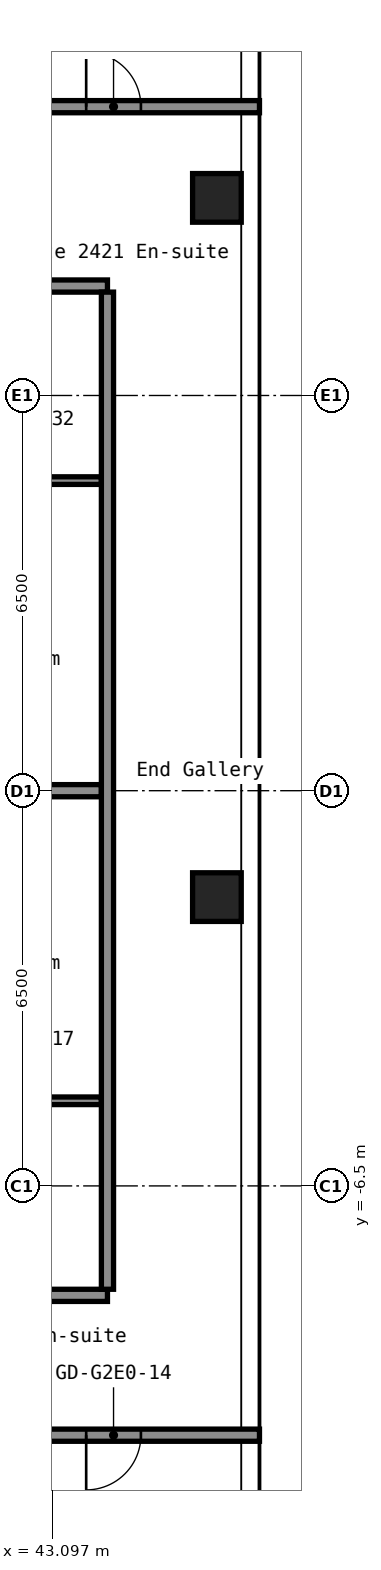
"""IFC4 building model, lengths in metres.
Left out: names, types, materials, properties, quantities, classifications, styles, units other than length and angle.
Written with IfcOpenShell. Run it as: python <this file> out.ifc"""

import sys

from ifc_helpers import new_model, si_unit, direction, frame, frame_2d, origin, origin_2d, place, context, subcontext, project, spatial, rectangle, hollow_rectangle, extrude, element, fill, save


model = new_model("IFC4")
c1 = context("Model", 3, precision=1e-05, world=origin(), true_north=direction((0.0, 1.0)))
c2 = subcontext(c1, "Body", "Model", "MODEL_VIEW")
j1 = project(units=[si_unit("LENGTHUNIT", "METRE"), si_unit("PLANEANGLEUNIT", "RADIAN")], contexts=[c1])
p1 = place(None, origin())
s1 = spatial("IfcSite", under=j1, at=p1, CompositionType="ELEMENT")
p2 = place(p1, origin())
s2 = spatial("IfcBuilding", under=s1, at=p2, CompositionType="ELEMENT")
p3 = place(p2, frame((0.0, 0.0, 88.2)))
s3 = spatial("IfcBuildingStorey", under=s2, at=p3, CompositionType="ELEMENT", Elevation=88.2)
for number, where, z_axis, x_axis in (
    (1, (45.8, -1.75, 0.0), (0.0, 0.0, 1.0), (1.0, 0.0, 0.0)),
    (2, (45.8, 9.75, 0.0), (0.0, 0.0, 1.0), (1.0, 0.0, 0.0)),
):
    element("IfcColumn", number, at=place(p3, frame(where, z_axis=z_axis, x_axis=x_axis)), inside=s3, PredefinedType="COLUMN", context=c2, shape_type="SweptSolid", body=[
        extrude(hollow_rectangle(XDim=0.8, YDim=0.8, WallThickness=0.032, at=origin_2d()), origin(), (0.0, 0.0, 1.0), 2.8),
    ])
p4 = place(p3, frame((16.8, -10.6, 0.0), z_axis=(0.0, 0.0, 1.0), x_axis=(1.0, 0.0, 0.0)))
e3 = element("IfcWall", 3, at=p4, inside=s3, PredefinedType="PARTITIONING", context=c2, shape_type="SweptSolid", body=[
    extrude(rectangle(XDim=29.7, YDim=0.2, at=frame_2d((14.85, 0.0))), origin(), (0.0, 0.0, 1.0), 2.8),
])
p5 = place(p4, frame((1.315, 0.0, 0.0)))
e4 = element("IfcOpeningElement", 4, at=p5, cuts=e3, PredefinedType="OPENING", context=c2, shape_type="SweptSolid", body=[
    extrude(rectangle(XDim=0.9, YDim=2.1, at=frame_2d((0.45, 1.05))), frame((0.0, 0.11, 0.0), z_axis=(0.0, -1.0, 0.0), x_axis=(1.0, 0.0, 0.0)), (0.0, 0.0, 1.0), 0.22),
])
p6 = place(p4, frame((5.515, 0.0, 0.0)))
e5 = element("IfcOpeningElement", 5, at=p6, cuts=e3, PredefinedType="OPENING", context=c2, shape_type="SweptSolid", body=[
    extrude(rectangle(XDim=0.9, YDim=2.1, at=frame_2d((0.45, 1.05))), frame((0.0, 0.11, 0.0), z_axis=(0.0, -1.0, 0.0), x_axis=(1.0, 0.0, 0.0)), (0.0, 0.0, 1.0), 0.22),
])
p7 = place(p4, frame((9.8, 0.0, 0.0)))
e6 = element("IfcOpeningElement", 6, at=p7, cuts=e3, PredefinedType="OPENING", context=c2, shape_type="SweptSolid", body=[
    extrude(rectangle(XDim=0.9, YDim=2.1, at=frame_2d((0.45, 1.05))), frame((0.0, 0.11, 0.0), z_axis=(0.0, -1.0, 0.0), x_axis=(1.0, 0.0, 0.0)), (0.0, 0.0, 1.0), 0.22),
])
p8 = place(p4, frame((14.0, 0.0, 0.0)))
e7 = element("IfcOpeningElement", 7, at=p8, cuts=e3, PredefinedType="OPENING", context=c2, shape_type="SweptSolid", body=[
    extrude(rectangle(XDim=0.9, YDim=2.1, at=frame_2d((0.45, 1.05))), frame((0.0, 0.11, 0.0), z_axis=(0.0, -1.0, 0.0), x_axis=(1.0, 0.0, 0.0)), (0.0, 0.0, 1.0), 0.22),
])
p9 = place(p4, frame((18.28, 0.0, 0.0)))
e8 = element("IfcOpeningElement", 8, at=p9, cuts=e3, PredefinedType="OPENING", context=c2, shape_type="SweptSolid", body=[
    extrude(rectangle(XDim=0.9, YDim=2.1, at=frame_2d((0.45, 1.05))), frame((0.0, 0.11, 0.0), z_axis=(0.0, -1.0, 0.0), x_axis=(1.0, 0.0, 0.0)), (0.0, 0.0, 1.0), 0.22),
])
p10 = place(p4, frame((22.48, 0.0, 0.0)))
e9 = element("IfcOpeningElement", 9, at=p10, cuts=e3, PredefinedType="OPENING", context=c2, shape_type="SweptSolid", body=[
    extrude(rectangle(XDim=0.9, YDim=2.1, at=frame_2d((0.45, 1.05))), frame((0.0, 0.11, 0.0), z_axis=(0.0, -1.0, 0.0), x_axis=(1.0, 0.0, 0.0)), (0.0, 0.0, 1.0), 0.22),
])
p11 = place(p4, frame((26.85, 0.0, 0.0)))
e10 = element("IfcOpeningElement", 10, at=p11, cuts=e3, PredefinedType="OPENING", context=c2, shape_type="SweptSolid", body=[
    extrude(rectangle(XDim=0.9, YDim=2.1, at=frame_2d((0.45, 1.05))), frame((0.0, 0.11, 0.0), z_axis=(0.0, -1.0, 0.0), x_axis=(1.0, 0.0, 0.0)), (0.0, 0.0, 1.0), 0.22),
])
p12 = place(p3, frame((33.6, -8.3, 0.0), z_axis=(0.0, 0.0, 1.0), x_axis=(1.0, 0.0, 0.0)))
e11 = element("IfcWall", 11, at=p12, inside=s3, PredefinedType="PARTITIONING", context=c2, shape_type="SweptSolid", body=[
    extrude(rectangle(XDim=10.4, YDim=0.2, at=frame_2d((5.2, 0.0))), origin(), (0.0, 0.0, 1.0), 2.8),
])
p13 = place(p12, frame((2.1, 0.0, 0.0)))
e12 = element("IfcOpeningElement", 12, at=p13, cuts=e11, PredefinedType="OPENING", context=c2, shape_type="SweptSolid", body=[
    extrude(rectangle(XDim=1.0, YDim=2.1, at=frame_2d((0.5, 1.05))), frame((0.0, 0.11, 0.0), z_axis=(0.0, -1.0, 0.0), x_axis=(1.0, 0.0, 0.0)), (0.0, 0.0, 1.0), 0.22),
])
p14 = place(p3, frame((41.062, -5.1, 0.0), z_axis=(0.0, 0.0, 1.0), x_axis=(1.0, 0.0, 0.0)))
e13 = element("IfcWall", 13, at=p14, inside=s3, PredefinedType="PARTITIONING", context=c2, shape_type="SweptSolid", body=[
    extrude(rectangle(XDim=2.837, YDim=0.125, at=frame_2d((1.419, 0.0))), origin(), (0.0, 0.0, 1.0), 2.8),
])
p15 = place(p14, frame((1.038, 0.0, 0.0)))
e14 = element("IfcOpeningElement", 14, at=p15, cuts=e13, PredefinedType="OPENING", context=c2, shape_type="SweptSolid", body=[
    extrude(rectangle(XDim=0.8, YDim=2.1, at=frame_2d((0.4, 1.05))), frame((0.0, 0.073, 0.0), z_axis=(0.0, -1.0, 0.0), x_axis=(1.0, 0.0, 0.0)), (0.0, 0.0, 1.0), 0.145),
])
p16 = place(p3, frame((33.6, 0.0, 0.0), z_axis=(0.0, 0.0, 1.0), x_axis=(1.0, 0.0, 0.0)))
e15 = element("IfcWall", 15, at=p16, inside=s3, PredefinedType="PARTITIONING", context=c2, shape_type="SweptSolid", body=[
    extrude(rectangle(XDim=10.3, YDim=0.2, at=frame_2d((5.15, 0.0))), origin(), (0.0, 0.0, 1.0), 2.8),
])
p17 = place(p3, frame((41.062, 5.1, 0.0), z_axis=(0.0, 0.0, 1.0), x_axis=(1.0, 0.0, 0.0)))
e16 = element("IfcWall", 16, at=p17, inside=s3, PredefinedType="PARTITIONING", context=c2, shape_type="SweptSolid", body=[
    extrude(rectangle(XDim=2.837, YDim=0.125, at=frame_2d((1.419, 0.0))), origin(), (0.0, 0.0, 1.0), 2.8),
])
p18 = place(p17, frame((1.038, 0.0, 0.0)))
e17 = element("IfcOpeningElement", 17, at=p18, cuts=e16, PredefinedType="OPENING", context=c2, shape_type="SweptSolid", body=[
    extrude(rectangle(XDim=0.8, YDim=2.1, at=frame_2d((0.4, 1.05))), frame((0.0, 0.073, 0.0), z_axis=(0.0, -1.0, 0.0), x_axis=(1.0, 0.0, 0.0)), (0.0, 0.0, 1.0), 0.145),
])
p19 = place(p3, frame((33.6, 8.3, 0.0), z_axis=(0.0, 0.0, 1.0), x_axis=(1.0, 0.0, 0.0)))
e18 = element("IfcWall", 18, at=p19, inside=s3, PredefinedType="PARTITIONING", context=c2, shape_type="SweptSolid", body=[
    extrude(rectangle(XDim=10.4, YDim=0.2, at=frame_2d((5.2, 0.0))), origin(), (0.0, 0.0, 1.0), 2.8),
])
p20 = place(p19, frame((2.1, 0.0, 0.0)))
e19 = element("IfcOpeningElement", 19, at=p20, cuts=e18, PredefinedType="OPENING", context=c2, shape_type="SweptSolid", body=[
    extrude(rectangle(XDim=1.0, YDim=2.1, at=frame_2d((0.5, 1.05))), frame((0.0, 0.11, 0.0), z_axis=(0.0, -1.0, 0.0), x_axis=(1.0, 0.0, 0.0)), (0.0, 0.0, 1.0), 0.22),
])
p21 = place(p3, frame((16.8, 11.25, 0.0), z_axis=(0.0, 0.0, 1.0), x_axis=(1.0, 0.0, 0.0)))
e20 = element("IfcWall", 20, at=p21, inside=s3, PredefinedType="PARTITIONING", context=c2, shape_type="SweptSolid", body=[
    extrude(rectangle(XDim=29.7, YDim=0.2, at=frame_2d((14.85, 0.0))), origin(), (0.0, 0.0, 1.0), 2.8),
])
p22 = place(p21, frame((5.8, 0.0, 0.0)))
e21 = element("IfcOpeningElement", 21, at=p22, cuts=e20, PredefinedType="OPENING", context=c2, shape_type="SweptSolid", body=[
    extrude(rectangle(XDim=1.0, YDim=2.1, at=frame_2d((0.5, 1.05))), frame((0.0, 0.11, 0.0), z_axis=(0.0, -1.0, 0.0), x_axis=(1.0, 0.0, 0.0)), (0.0, 0.0, 1.0), 0.22),
])
p23 = place(p21, frame((14.2, 0.0, 0.0)))
e22 = element("IfcOpeningElement", 22, at=p23, cuts=e20, PredefinedType="OPENING", context=c2, shape_type="SweptSolid", body=[
    extrude(rectangle(XDim=1.0, YDim=2.1, at=frame_2d((0.5, 1.05))), frame((0.0, 0.11, 0.0), z_axis=(0.0, -1.0, 0.0), x_axis=(1.0, 0.0, 0.0)), (0.0, 0.0, 1.0), 0.22),
])
p24 = place(p21, frame((22.6, 0.0, 0.0)))
e23 = element("IfcOpeningElement", 23, at=p24, cuts=e20, PredefinedType="OPENING", context=c2, shape_type="SweptSolid", body=[
    extrude(rectangle(XDim=1.0, YDim=2.1, at=frame_2d((0.5, 1.05))), frame((0.0, 0.11, 0.0), z_axis=(0.0, -1.0, 0.0), x_axis=(1.0, 0.0, 0.0)), (0.0, 0.0, 1.0), 0.22),
])
p25 = place(p21, frame((26.85, 0.0, 0.0)))
e24 = element("IfcOpeningElement", 24, at=p25, cuts=e20, PredefinedType="OPENING", context=c2, shape_type="SweptSolid", body=[
    extrude(rectangle(XDim=0.9, YDim=2.1, at=frame_2d((0.45, 1.05))), frame((0.0, 0.11, 0.0), z_axis=(0.0, -1.0, 0.0), x_axis=(1.0, 0.0, 0.0)), (0.0, 0.0, 1.0), 0.22),
])
p26 = place(p3, frame((44.0, -8.2, 0.0), z_axis=(0.0, 0.0, 1.0), x_axis=(0.0, 1.0, 0.0)))
e25 = element("IfcWall", 25, at=p26, inside=s3, PredefinedType="PARTITIONING", context=c2, shape_type="SweptSolid", body=[
    extrude(rectangle(XDim=16.4, YDim=0.2, at=frame_2d((8.2, 0.0))), origin(), (0.0, 0.0, 1.0), 2.8),
])
p27 = place(p11, origin())
e26 = element("IfcDoor", 26, at=p27, inside=s3, OperationType="SINGLE_SWING_LEFT", PredefinedType="DOOR", context=c2, shape_type="SweptSolid", body=[
    extrude(rectangle(XDim=0.9, YDim=2.1, at=frame_2d((0.45, 1.05))), frame((0.0, 0.025, 0.0), z_axis=(0.0, -1.0, 0.0), x_axis=(1.0, 0.0, 0.0)), (0.0, 0.0, 1.0), 0.05),
])
fill(e10, e26)
p28 = place(p25, origin())
e27 = element("IfcDoor", 27, at=p28, inside=s3, OperationType="SINGLE_SWING_RIGHT", PredefinedType="DOOR", context=c2, shape_type="SweptSolid", body=[
    extrude(rectangle(XDim=0.9, YDim=2.1, at=frame_2d((0.45, 1.05))), frame((0.0, 0.025, 0.0), z_axis=(0.0, -1.0, 0.0), x_axis=(1.0, 0.0, 0.0)), (0.0, 0.0, 1.0), 0.05),
])
fill(e24, e27)
save(model, sys.argv[1])
